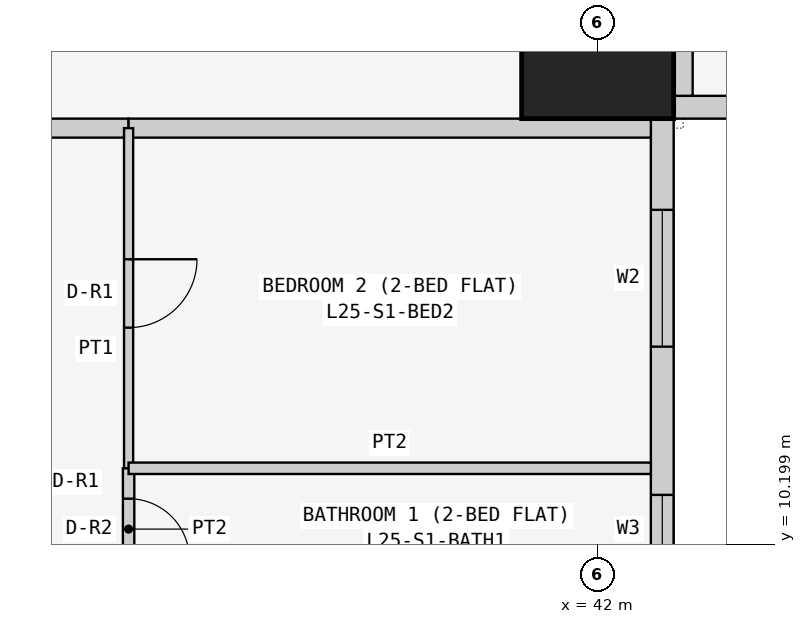
"""IFC4 building model, lengths in metres.
Left out: names, types, materials, properties, quantities, classifications, styles, units other than length and angle.
Written with IfcOpenShell. Run it as: python <this file> out.ifc"""

import sys

from ifc_helpers import new_model, si_unit, direction, frame, frame_2d, origin, origin_2d, place, context, subcontext, project, spatial, rectangle, extrude, element, fill, save


model = new_model("IFC4")
c1 = context("Model", 3, precision=1e-05, world=origin(), true_north=direction((0.0, 1.0)))
c2 = subcontext(c1, "Body", "Model", "MODEL_VIEW")
j1 = project(units=[si_unit("LENGTHUNIT", "METRE"), si_unit("PLANEANGLEUNIT", "RADIAN")], contexts=[c1])
p1 = place(None, origin())
s1 = spatial("IfcSite", under=j1, at=p1, CompositionType="ELEMENT")
p2 = place(p1, origin())
s2 = spatial("IfcBuilding", under=s1, at=p2, CompositionType="ELEMENT")
p3 = place(p2, frame((0.0, 0.0, 99.3)))
s3 = spatial("IfcBuildingStorey", under=s2, at=p3, CompositionType="ELEMENT", Elevation=99.3)
p4 = place(p3, frame((42.0, 16.8, 0.0), z_axis=(0.0, 0.0, 1.0), x_axis=(1.0, 0.0, 0.0)))
e1 = element("IfcColumn", 1, at=p4, inside=s3, PredefinedType="COLUMN", context=c2, shape_type="SweptSolid", body=[
    extrude(rectangle(XDim=2.0, YDim=2.0, at=origin_2d()), origin(), (0.0, 0.0, 1.0), 3.6),
])
p5 = place(p3, frame((42.85, 0.4, 0.0), z_axis=(0.0, 0.0, 1.0), x_axis=(0.0, 1.0, 0.0)))
e2 = element("IfcWall", 2, at=p5, inside=s3, PredefinedType="SOLIDWALL", context=c2, shape_type="SweptSolid", body=[
    extrude(rectangle(XDim=15.7, YDim=0.3, at=frame_2d((7.85, 0.0))), origin(), (0.0, 0.0, 1.0), 3.35),
])
p6 = place(p5, frame((12.4, 0.0, 0.9)))
e3 = element("IfcOpeningElement", 3, at=p6, cuts=e2, PredefinedType="OPENING", context=c2, shape_type="SweptSolid", body=[
    extrude(rectangle(XDim=1.8, YDim=1.5, at=frame_2d((0.9, 0.75))), frame((0.0, 0.16, 0.0), z_axis=(0.0, -1.0, 0.0), x_axis=(1.0, 0.0, 0.0)), (0.0, 0.0, 1.0), 0.32),
])
p7 = place(p5, frame((9.55, 0.0, 1.5)))
e4 = element("IfcOpeningElement", 4, at=p7, cuts=e2, PredefinedType="OPENING", context=c2, shape_type="SweptSolid", body=[
    extrude(rectangle(XDim=0.9, YDim=0.7, at=frame_2d((0.45, 0.35))), frame((0.0, 0.16, 0.0), z_axis=(0.0, -1.0, 0.0), x_axis=(1.0, 0.0, 0.0)), (0.0, 0.0, 1.0), 0.32),
])
p8 = place(p5, frame((5.1, 0.0, 0.9)))
e5 = element("IfcOpeningElement", 5, at=p8, cuts=e2, PredefinedType="OPENING", context=c2, shape_type="SweptSolid", body=[
    extrude(rectangle(XDim=1.8, YDim=1.5, at=frame_2d((0.9, 0.75))), frame((0.0, 0.16, 0.0), z_axis=(0.0, -1.0, 0.0), x_axis=(1.0, 0.0, 0.0)), (0.0, 0.0, 1.0), 0.32),
])
p9 = place(p5, frame((2.0, 0.0, 0.0)))
e6 = element("IfcOpeningElement", 6, at=p9, cuts=e2, PredefinedType="OPENING", context=c2, shape_type="SweptSolid", body=[
    extrude(rectangle(XDim=0.9, YDim=2.4, at=frame_2d((0.45, 1.2))), frame((0.0, 0.16, 0.0), z_axis=(0.0, -1.0, 0.0), x_axis=(1.0, 0.0, 0.0)), (0.0, 0.0, 1.0), 0.32),
])
p10 = place(p5, frame((0.7, 0.0, 0.9)))
e7 = element("IfcOpeningElement", 7, at=p10, cuts=e2, PredefinedType="OPENING", context=c2, shape_type="SweptSolid", body=[
    extrude(rectangle(XDim=1.2, YDim=1.5, at=frame_2d((0.6, 0.75))), frame((0.0, 0.16, 0.0), z_axis=(0.0, -1.0, 0.0), x_axis=(1.0, 0.0, 0.0)), (0.0, 0.0, 1.0), 0.32),
])
p11 = place(p3, frame((43.0, 15.95, 0.0), z_axis=(0.0, 0.0, 1.0), x_axis=(1.0, 0.0, 0.0)))
e8 = element("IfcWall", 8, at=p11, inside=s3, PredefinedType="SOLIDWALL", context=c2, shape_type="SweptSolid", body=[
    extrude(rectangle(XDim=15.4, YDim=0.3, at=frame_2d((7.7, 0.0))), origin(), (0.0, 0.0, 1.0), 3.35),
])
p12 = place(p11, frame((1.2, 0.0, 0.9)))
e9 = element("IfcOpeningElement", 9, at=p12, cuts=e8, PredefinedType="OPENING", context=c2, shape_type="SweptSolid", body=[
    extrude(rectangle(XDim=1.8, YDim=1.5, at=frame_2d((0.9, 0.75))), frame((0.0, 0.16, 0.0), z_axis=(0.0, -1.0, 0.0), x_axis=(1.0, 0.0, 0.0)), (0.0, 0.0, 1.0), 0.32),
])
p13 = place(p11, frame((4.95, 0.0, 1.5)))
e10 = element("IfcOpeningElement", 10, at=p13, cuts=e8, PredefinedType="OPENING", context=c2, shape_type="SweptSolid", body=[
    extrude(rectangle(XDim=0.9, YDim=0.7, at=frame_2d((0.45, 0.35))), frame((0.0, 0.16, 0.0), z_axis=(0.0, -1.0, 0.0), x_axis=(1.0, 0.0, 0.0)), (0.0, 0.0, 1.0), 0.32),
])
p14 = place(p11, frame((8.5, 0.0, 0.9)))
e11 = element("IfcOpeningElement", 11, at=p14, cuts=e8, PredefinedType="OPENING", context=c2, shape_type="SweptSolid", body=[
    extrude(rectangle(XDim=1.8, YDim=1.5, at=frame_2d((0.9, 0.75))), frame((0.0, 0.16, 0.0), z_axis=(0.0, -1.0, 0.0), x_axis=(1.0, 0.0, 0.0)), (0.0, 0.0, 1.0), 0.32),
])
p15 = place(p11, frame((12.5, 0.0, 0.0)))
e12 = element("IfcOpeningElement", 12, at=p15, cuts=e8, PredefinedType="OPENING", context=c2, shape_type="SweptSolid", body=[
    extrude(rectangle(XDim=0.9, YDim=2.4, at=frame_2d((0.45, 1.2))), frame((0.0, 0.16, 0.0), z_axis=(0.0, -1.0, 0.0), x_axis=(1.0, 0.0, 0.0)), (0.0, 0.0, 1.0), 0.32),
])
p16 = place(p11, frame((13.5, 0.0, 0.9)))
e13 = element("IfcOpeningElement", 13, at=p16, cuts=e8, PredefinedType="OPENING", context=c2, shape_type="SweptSolid", body=[
    extrude(rectangle(XDim=1.2, YDim=1.5, at=frame_2d((0.6, 0.75))), frame((0.0, 0.16, 0.0), z_axis=(0.0, -1.0, 0.0), x_axis=(1.0, 0.0, 0.0)), (0.0, 0.0, 1.0), 0.32),
])
p17 = place(p3, frame((43.125, 22.571, 0.0), z_axis=(0.0, 0.0, 1.0), x_axis=(0.0, -1.0, 0.0)))
e14 = element("IfcWall", 14, at=p17, inside=s3, PredefinedType="PARTITIONING", context=c2, shape_type="SweptSolid", body=[
    extrude(rectangle(XDim=6.471, YDim=0.25, at=frame_2d((3.235, 0.0))), origin(), (0.0, 0.0, 1.0), 3.35),
])
p18 = place(p3, frame((35.829, 15.675, 0.0), z_axis=(0.0, 0.0, 1.0), x_axis=(-1.0, 0.0, 0.0)))
e15 = element("IfcWall", 15, at=p18, inside=s3, PredefinedType="PARTITIONING", context=c2, shape_type="SweptSolid", body=[
    extrude(rectangle(XDim=1.2, YDim=0.25, at=frame_2d((0.6, 0.0))), origin(), (0.0, 0.0, 1.0), 3.35),
])
p19 = place(p3, frame((42.7, 15.675, 0.0), z_axis=(0.0, 0.0, 1.0), x_axis=(-1.0, 0.0, 0.0)))
e16 = element("IfcWall", 16, at=p19, inside=s3, PredefinedType="PARTITIONING", context=c2, shape_type="SweptSolid", body=[
    extrude(rectangle(XDim=6.871, YDim=0.25, at=frame_2d((3.436, 0.0))), origin(), (0.0, 0.0, 1.0), 3.35),
])
p20 = place(p3, frame((35.829, 11.2, 0.0), z_axis=(0.0, 0.0, 1.0), x_axis=(0.0, 1.0, 0.0)))
e17 = element("IfcWall", 17, at=p20, inside=s3, PredefinedType="PARTITIONING", context=c2, shape_type="SweptSolid", body=[
    extrude(rectangle(XDim=4.475, YDim=0.12, at=frame_2d((2.238, 0.0))), origin(), (0.0, 0.0, 1.0), 3.35),
])
p21 = place(p20, frame((1.85, 0.0, 0.0)))
e18 = element("IfcOpeningElement", 18, at=p21, cuts=e17, PredefinedType="OPENING", context=c2, shape_type="SweptSolid", body=[
    extrude(rectangle(XDim=0.9, YDim=2.1, at=frame_2d((0.45, 1.05))), frame((0.0, 0.07, 0.0), z_axis=(0.0, -1.0, 0.0), x_axis=(1.0, 0.0, 0.0)), (0.0, 0.0, 1.0), 0.14),
])
p22 = place(p3, frame((35.829, 9.6, 0.0), z_axis=(0.0, 0.0, 1.0), x_axis=(0.0, 1.0, 0.0)))
e19 = element("IfcWall", 19, at=p22, inside=s3, PredefinedType="PARTITIONING", context=c2, shape_type="SweptSolid", body=[
    extrude(rectangle(XDim=1.6, YDim=0.15, at=frame_2d((0.8, 0.0))), origin(), (0.0, 0.0, 1.0), 3.35),
])
p23 = place(p22, frame((0.4, 0.0, 0.0)))
e20 = element("IfcOpeningElement", 20, at=p23, cuts=e19, PredefinedType="OPENING", context=c2, shape_type="SweptSolid", body=[
    extrude(rectangle(XDim=0.8, YDim=2.1, at=frame_2d((0.4, 1.05))), frame((0.0, 0.085, 0.0), z_axis=(0.0, -1.0, 0.0), x_axis=(1.0, 0.0, 0.0)), (0.0, 0.0, 1.0), 0.17),
])
p24 = place(p3, frame((35.829, 11.2, 0.0), z_axis=(0.0, 0.0, 1.0), x_axis=(1.0, 0.0, 0.0)))
e21 = element("IfcWall", 21, at=p24, inside=s3, PredefinedType="PARTITIONING", context=c2, shape_type="SweptSolid", body=[
    extrude(rectangle(XDim=6.871, YDim=0.15, at=frame_2d((3.436, 0.0))), origin(), (0.0, 0.0, 1.0), 3.35),
])
p25 = place(p6, origin())
e22 = element("IfcWindow", 22, at=p25, inside=s3, PartitioningType="SINGLE_PANEL", PredefinedType="WINDOW", context=c2, shape_type="SweptSolid", body=[
    extrude(rectangle(XDim=1.8, YDim=1.5, at=frame_2d((0.9, 0.75))), frame((0.0, 0.03, 0.0), z_axis=(0.0, -1.0, 0.0), x_axis=(1.0, 0.0, 0.0)), (0.0, 0.0, 1.0), 0.06),
])
fill(e3, e22)
p26 = place(p7, origin())
e23 = element("IfcWindow", 23, at=p26, inside=s3, PartitioningType="SINGLE_PANEL", PredefinedType="WINDOW", context=c2, shape_type="SweptSolid", body=[
    extrude(rectangle(XDim=0.9, YDim=0.7, at=frame_2d((0.45, 0.35))), frame((0.0, 0.03, 0.0), z_axis=(0.0, -1.0, 0.0), x_axis=(1.0, 0.0, 0.0)), (0.0, 0.0, 1.0), 0.06),
])
fill(e4, e23)
p27 = place(p21, frame((0.9, 0.0, 0.0), z_axis=(0.0, 0.0, 1.0), x_axis=(-1.0, 0.0, 0.0)))
e24 = element("IfcDoor", 24, at=p27, inside=s3, OperationType="SINGLE_SWING_LEFT", PredefinedType="DOOR", context=c2, shape_type="SweptSolid", body=[
    extrude(rectangle(XDim=0.9, YDim=2.1, at=frame_2d((0.45, 1.05))), frame((0.0, 0.025, 0.0), z_axis=(0.0, -1.0, 0.0), x_axis=(1.0, 0.0, 0.0)), (0.0, 0.0, 1.0), 0.05),
])
fill(e18, e24)
p28 = place(p23, frame((0.8, 0.0, 0.0), z_axis=(0.0, 0.0, 1.0), x_axis=(-1.0, 0.0, 0.0)))
e25 = element("IfcDoor", 25, at=p28, inside=s3, OperationType="SINGLE_SWING_RIGHT", PredefinedType="DOOR", context=c2, shape_type="SweptSolid", body=[
    extrude(rectangle(XDim=0.8, YDim=2.1, at=frame_2d((0.4, 1.05))), frame((0.0, 0.025, 0.0), z_axis=(0.0, -1.0, 0.0), x_axis=(1.0, 0.0, 0.0)), (0.0, 0.0, 1.0), 0.05),
])
fill(e20, e25)
save(model, sys.argv[1])
